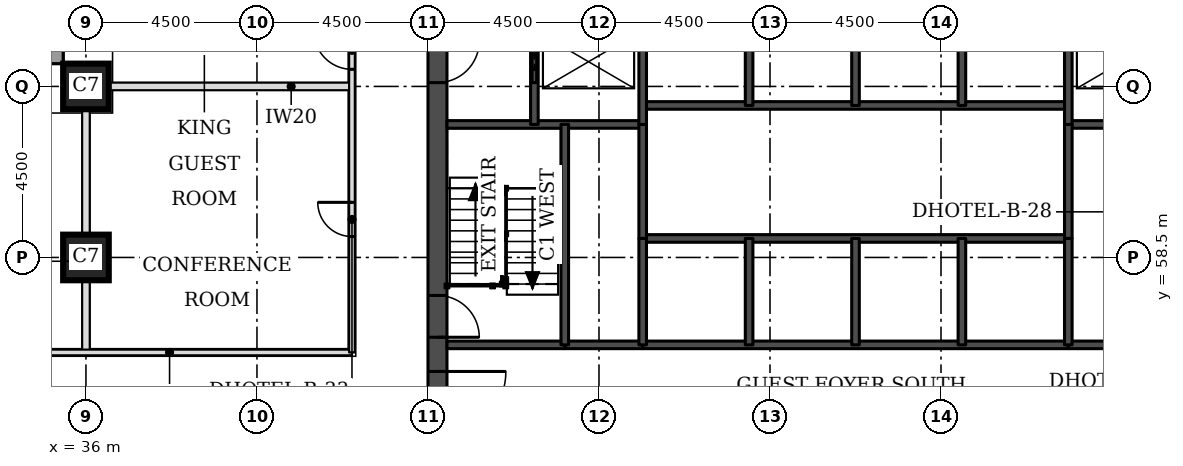
"""IFC4 building model, lengths in metres.
Left out: names, types, materials, properties, quantities, classifications, styles, units other than length and angle.
Written with IfcOpenShell. Run it as: python <this file> out.ifc"""

import sys

from ifc_helpers import new_model, si_unit, direction, frame, frame_2d, origin, origin_2d, place, context, subcontext, project, spatial, rectangle, extrude, element, fill, save


model = new_model("IFC4")
c1 = context("Model", 3, precision=1e-05, world=origin(), true_north=direction((0.0, 1.0)))
c2 = subcontext(c1, "Body", "Model", "MODEL_VIEW")
j1 = project(units=[si_unit("LENGTHUNIT", "METRE"), si_unit("PLANEANGLEUNIT", "RADIAN")], contexts=[c1])
p1 = place(None, origin())
s1 = spatial("IfcSite", under=j1, at=p1, CompositionType="ELEMENT")
p2 = place(p1, origin())
s2 = spatial("IfcBuilding", under=s1, at=p2, CompositionType="ELEMENT")
p3 = place(p2, frame((0.0, 0.0, 29.7)))
s3 = spatial("IfcBuildingStorey", under=s2, at=p3, CompositionType="ELEMENT", Elevation=29.7)
for number, where, z_axis, x_axis in (
    (1, (36.0, 58.5, 0.0), (0.0, 0.0, 1.0), (1.0, 0.0, 0.0)),
    (2, (36.0, 63.0, 0.0), (0.0, 0.0, 1.0), (1.0, 0.0, 0.0)),
):
    element("IfcColumn", number, at=place(p3, frame(where, z_axis=z_axis, x_axis=x_axis)), inside=s3, PredefinedType="COLUMN", context=c2, shape_type="SweptSolid", body=[
        extrude(rectangle(XDim=1.2, YDim=1.2, at=origin_2d()), origin(), (0.0, 0.0, 1.0), 3.3),
    ])
p4 = place(p3, frame((45.25, 49.5, 0.0), z_axis=(0.0, 0.0, 1.0), x_axis=(0.0, 1.0, 0.0)))
e3 = element("IfcWall", 3, at=p4, inside=s3, PredefinedType="SHEAR", context=c2, shape_type="SweptSolid", body=[
    extrude(rectangle(XDim=22.5, YDim=0.5, at=frame_2d((11.25, 0.0))), origin(), (0.0, 0.0, 1.0), 3.3),
])
p5 = place(p4, frame((4.2, 0.0, 0.0)))
e4 = element("IfcOpeningElement", 4, at=p5, cuts=e3, PredefinedType="OPENING", context=c2, shape_type="SweptSolid", body=[
    extrude(rectangle(XDim=1.8, YDim=2.1, at=frame_2d((0.9, 1.05))), frame((0.0, 0.26, 0.0), z_axis=(0.0, -1.0, 0.0), x_axis=(1.0, 0.0, 0.0)), (0.0, 0.0, 1.0), 0.52),
])
p6 = place(p4, frame((6.9, 0.0, 0.0)))
e5 = element("IfcOpeningElement", 5, at=p6, cuts=e3, PredefinedType="OPENING", context=c2, shape_type="SweptSolid", body=[
    extrude(rectangle(XDim=1.1, YDim=2.1, at=frame_2d((0.55, 1.05))), frame((0.0, 0.26, 0.0), z_axis=(0.0, -1.0, 0.0), x_axis=(1.0, 0.0, 0.0)), (0.0, 0.0, 1.0), 0.52),
])
p7 = place(p4, frame((13.6, 0.0, 0.0)))
e6 = element("IfcOpeningElement", 6, at=p7, cuts=e3, PredefinedType="OPENING", context=c2, shape_type="SweptSolid", body=[
    extrude(rectangle(XDim=1.1, YDim=2.1, at=frame_2d((0.55, 1.05))), frame((0.0, 0.26, 0.0), z_axis=(0.0, -1.0, 0.0), x_axis=(1.0, 0.0, 0.0)), (0.0, 0.0, 1.0), 0.52),
])
p8 = place(p4, frame((16.5, 0.0, 0.0)))
e7 = element("IfcOpeningElement", 7, at=p8, cuts=e3, PredefinedType="OPENING", context=c2, shape_type="SweptSolid", body=[
    extrude(rectangle(XDim=1.8, YDim=2.1, at=frame_2d((0.9, 1.05))), frame((0.0, 0.26, 0.0), z_axis=(0.0, -1.0, 0.0), x_axis=(1.0, 0.0, 0.0)), (0.0, 0.0, 1.0), 0.52),
])
p9 = place(p3, frame((35.225, 76.894, 0.0), z_axis=(0.0, 0.0, 1.0), x_axis=(0.0, -1.0, 0.0)))
e8 = element("IfcWall", 8, at=p9, inside=s3, PredefinedType="STANDARD", context=c2, shape_type="SweptSolid", body=[
    extrude(rectangle(XDim=13.293, YDim=0.35, at=frame_2d((6.647, 0.0))), origin(), (0.0, 0.0, 1.0), 3.055),
])
p10 = place(p9, frame((9.493, 0.0, 0.8)))
e9 = element("IfcOpeningElement", 9, at=p10, cuts=e8, PredefinedType="OPENING", context=c2, shape_type="SweptSolid", body=[
    extrude(rectangle(XDim=3.3, YDim=1.5, at=frame_2d((1.65, 0.75))), frame((0.0, 0.185, 0.0), z_axis=(0.0, -1.0, 0.0), x_axis=(1.0, 0.0, 0.0)), (0.0, 0.0, 1.0), 0.37),
])
p11 = place(p3, frame((35.4, 63.775, 0.0), z_axis=(0.0, 0.0, 1.0), x_axis=(-1.0, 0.0, 0.0)))
e10 = element("IfcWall", 10, at=p11, inside=s3, PredefinedType="STANDARD", context=c2, shape_type="SweptSolid", body=[
    extrude(rectangle(XDim=17.793, YDim=0.35, at=frame_2d((8.897, 0.0))), origin(), (0.0, 0.0, 1.0), 3.055),
])
p12 = place(p11, frame((0.5, 0.0, 0.8)))
e11 = element("IfcOpeningElement", 11, at=p12, cuts=e10, PredefinedType="OPENING", context=c2, shape_type="SweptSolid", body=[
    extrude(rectangle(XDim=3.3, YDim=1.5, at=frame_2d((1.65, 0.75))), frame((0.0, 0.185, 0.0), z_axis=(0.0, -1.0, 0.0), x_axis=(1.0, 0.0, 0.0)), (0.0, 0.0, 1.0), 0.37),
])
p13 = place(p11, frame((9.0, 0.0, 0.8)))
e12 = element("IfcOpeningElement", 12, at=p13, cuts=e10, PredefinedType="OPENING", context=c2, shape_type="SweptSolid", body=[
    extrude(rectangle(XDim=3.3, YDim=1.5, at=frame_2d((1.65, 0.75))), frame((0.0, 0.185, 0.0), z_axis=(0.0, -1.0, 0.0), x_axis=(1.0, 0.0, 0.0)), (0.0, 0.0, 1.0), 0.37),
])
p14 = place(p3, frame((36.0, 56.0, 0.0), z_axis=(0.0, 0.0, 1.0), x_axis=(0.0, 1.0, 0.0)))
e13 = element("IfcWall", 13, at=p14, inside=s3, PredefinedType="PARTITIONING", context=c2, shape_type="SweptSolid", body=[
    extrude(rectangle(XDim=6.4, YDim=0.2, at=frame_2d((3.2, 0.0))), origin(), (0.0, 0.0, 1.0), 2.33),
])
p15 = place(p3, frame((36.6, 63.0, 0.0), z_axis=(0.0, 0.0, 1.0), x_axis=(1.0, 0.0, 0.0)))
e14 = element("IfcWall", 14, at=p15, inside=s3, PredefinedType="PARTITIONING", context=c2, shape_type="SweptSolid", body=[
    extrude(rectangle(XDim=6.4, YDim=0.2, at=frame_2d((3.2, 0.0))), origin(), (0.0, 0.0, 1.0), 3.08),
])
p16 = place(p3, frame((27.0, 56.0, 0.0), z_axis=(0.0, 0.0, 1.0), x_axis=(1.0, 0.0, 0.0)))
e15 = element("IfcWall", 15, at=p16, inside=s3, PredefinedType="PARTITIONING", context=c2, shape_type="SweptSolid", body=[
    extrude(rectangle(XDim=16.0, YDim=0.15, at=frame_2d((8.0, 0.0))), origin(), (0.0, 0.0, 1.0), 3.08),
])
p17 = place(p16, frame((5.6, 0.0, 0.0)))
e16 = element("IfcOpeningElement", 16, at=p17, cuts=e15, PredefinedType="OPENING", context=c2, shape_type="SweptSolid", body=[
    extrude(rectangle(XDim=1.0, YDim=2.1, at=frame_2d((0.5, 1.05))), frame((0.0, 0.085, 0.0), z_axis=(0.0, -1.0, 0.0), x_axis=(1.0, 0.0, 0.0)), (0.0, 0.0, 1.0), 0.17),
])
p18 = place(p3, frame((43.0, 56.0, 0.0), z_axis=(0.0, 0.0, 1.0), x_axis=(0.0, 1.0, 0.0)))
e17 = element("IfcWall", 17, at=p18, inside=s3, PredefinedType="PARTITIONING", context=c2, shape_type="SweptSolid", body=[
    extrude(rectangle(XDim=18.0, YDim=0.15, at=frame_2d((9.0, 0.0))), origin(), (0.0, 0.0, 1.0), 3.08),
])
p19 = place(p18, frame((7.45, 0.0, 0.0)))
e18 = element("IfcOpeningElement", 18, at=p19, cuts=e17, PredefinedType="OPENING", context=c2, shape_type="SweptSolid", body=[
    extrude(rectangle(XDim=1.0, YDim=2.1, at=frame_2d((0.5, 1.05))), frame((0.0, 0.085, 0.0), z_axis=(0.0, -1.0, 0.0), x_axis=(1.0, 0.0, 0.0)), (0.0, 0.0, 1.0), 0.17),
])
p20 = place(p18, frame((14.3, 0.0, 0.0)))
e19 = element("IfcOpeningElement", 19, at=p20, cuts=e17, PredefinedType="OPENING", context=c2, shape_type="SweptSolid", body=[
    extrude(rectangle(XDim=1.0, YDim=2.1, at=frame_2d((0.5, 1.05))), frame((0.0, 0.085, 0.0), z_axis=(0.0, -1.0, 0.0), x_axis=(1.0, 0.0, 0.0)), (0.0, 0.0, 1.0), 0.17),
])
p21 = place(p18, frame((16.45, 0.0, 0.0)))
e20 = element("IfcOpeningElement", 20, at=p21, cuts=e17, PredefinedType="OPENING", context=c2, shape_type="SweptSolid", body=[
    extrude(rectangle(XDim=1.0, YDim=2.1, at=frame_2d((0.5, 1.05))), frame((0.0, 0.085, 0.0), z_axis=(0.0, -1.0, 0.0), x_axis=(1.0, 0.0, 0.0)), (0.0, 0.0, 1.0), 0.17),
])
p22 = place(p18, frame((3.05, 0.0, 0.0)))
e21 = element("IfcOpeningElement", 21, at=p22, cuts=e17, PredefinedType="OPENING", context=c2, shape_type="SweptSolid", body=[
    extrude(rectangle(XDim=0.9, YDim=2.1, at=frame_2d((0.45, 1.05))), frame((0.0, 0.085, 0.0), z_axis=(0.0, -1.0, 0.0), x_axis=(1.0, 0.0, 0.0)), (0.0, 0.0, 1.0), 0.17),
])
for number, where, z_axis, x_axis in (
    (22, (48.6, 56.2, 0.0), (0.0, 0.0, 1.0), (1.0, 0.0, 0.0)),
    (23, (61.85, 56.2, 0.0), (0.0, 0.0, 1.0), (1.0, 0.0, 0.0)),
):
    element("IfcWall", number, at=place(p3, frame(where, z_axis=z_axis, x_axis=x_axis)), inside=s3, PredefinedType="SOLIDWALL", context=c2, shape_type="SweptSolid", body=[
        extrude(rectangle(XDim=2.05, YDim=0.2, at=frame_2d((1.025, 0.0))), origin(), (0.0, 0.0, 1.0), 3.08),
    ])
p23 = place(p3, frame((45.5, 56.2, 0.0), z_axis=(0.0, 0.0, 1.0), x_axis=(1.0, 0.0, 0.0)))
e24 = element("IfcWall", 24, at=p23, inside=s3, PredefinedType="SOLIDWALL", context=c2, shape_type="SweptSolid", body=[
    extrude(rectangle(XDim=3.1, YDim=0.2, at=frame_2d((1.55, 0.0))), origin(), (0.0, 0.0, 1.0), 3.08),
])
p24 = place(p3, frame((50.65, 56.2, 0.0), z_axis=(0.0, 0.0, 1.0), x_axis=(1.0, 0.0, 0.0)))
e25 = element("IfcWall", 25, at=p24, inside=s3, PredefinedType="SOLIDWALL", context=c2, shape_type="SweptSolid", body=[
    extrude(rectangle(XDim=11.2, YDim=0.2, at=frame_2d((5.6, 0.0))), origin(), (0.0, 0.0, 1.0), 3.08),
])
p25 = place(p3, frame((50.65, 59.0, 0.0), z_axis=(0.0, 0.0, 1.0), x_axis=(1.0, 0.0, 0.0)))
e26 = element("IfcWall", 26, at=p25, inside=s3, PredefinedType="SOLIDWALL", context=c2, shape_type="SweptSolid", body=[
    extrude(rectangle(XDim=11.2, YDim=0.2, at=frame_2d((5.6, 0.0))), origin(), (0.0, 0.0, 1.0), 3.3),
])
for number, where, z_axis, x_axis in (
    (27, (45.5, 62.0, 0.0), (0.0, 0.0, 1.0), (1.0, 0.0, 0.0)),
    (28, (61.85, 62.0, 0.0), (0.0, 0.0, 1.0), (1.0, 0.0, 0.0)),
):
    element("IfcWall", number, at=place(p3, frame(where, z_axis=z_axis, x_axis=x_axis)), inside=s3, PredefinedType="SOLIDWALL", context=c2, shape_type="SweptSolid", body=[
        extrude(rectangle(XDim=5.15, YDim=0.2, at=frame_2d((2.575, 0.0))), origin(), (0.0, 0.0, 1.0), 3.08),
    ])
p26 = place(p3, frame((50.65, 62.5, 0.0), z_axis=(0.0, 0.0, 1.0), x_axis=(1.0, 0.0, 0.0)))
e29 = element("IfcWall", 29, at=p26, inside=s3, PredefinedType="SOLIDWALL", context=c2, shape_type="SweptSolid", body=[
    extrude(rectangle(XDim=11.2, YDim=0.2, at=frame_2d((5.6, 0.0))), origin(), (0.0, 0.0, 1.0), 3.3),
])
p27 = place(p3, frame((47.8, 62.0, 0.0), z_axis=(0.0, 0.0, 1.0), x_axis=(0.0, 1.0, 0.0)))
e30 = element("IfcWall", 30, at=p27, inside=s3, PredefinedType="SOLIDWALL", context=c2, shape_type="SweptSolid", body=[
    extrude(rectangle(XDim=3.3, YDim=0.2, at=frame_2d((1.65, 0.0))), origin(), (0.0, 0.0, 1.0), 3.08),
])
p28 = place(p27, frame((1.1, 0.0, 0.0)))
e31 = element("IfcOpeningElement", 31, at=p28, cuts=e30, PredefinedType="OPENING", context=c2, shape_type="SweptSolid", body=[
    extrude(rectangle(XDim=1.1, YDim=2.1, at=frame_2d((0.55, 1.05))), frame((0.0, 0.11, 0.0), z_axis=(0.0, -1.0, 0.0), x_axis=(1.0, 0.0, 0.0)), (0.0, 0.0, 1.0), 0.22),
])
p29 = place(p3, frame((48.6, 56.2, 0.0), z_axis=(0.0, 0.0, 1.0), x_axis=(0.0, 1.0, 0.0)))
e32 = element("IfcWall", 32, at=p29, inside=s3, PredefinedType="SOLIDWALL", context=c2, shape_type="SweptSolid", body=[
    extrude(rectangle(XDim=5.8, YDim=0.2, at=frame_2d((2.9, 0.0))), origin(), (0.0, 0.0, 1.0), 3.08),
])
p30 = place(p3, frame((50.65, 59.0, 0.0), z_axis=(0.0, 0.0, 1.0), x_axis=(0.0, 1.0, 0.0)))
e33 = element("IfcWall", 33, at=p30, inside=s3, PredefinedType="SOLIDWALL", context=c2, shape_type="SweptSolid", body=[
    extrude(rectangle(XDim=3.0, YDim=0.2, at=frame_2d((1.5, 0.0))), origin(), (0.0, 0.0, 1.0), 3.3),
])
p31 = place(p3, frame((50.65, 56.2, 0.0), z_axis=(0.0, 0.0, 1.0), x_axis=(0.0, 1.0, 0.0)))
e34 = element("IfcWall", 34, at=p31, inside=s3, PredefinedType="SOLIDWALL", context=c2, shape_type="SweptSolid", body=[
    extrude(rectangle(XDim=2.8, YDim=0.2, at=frame_2d((1.4, 0.0))), origin(), (0.0, 0.0, 1.0), 3.08),
])
p32 = place(p3, frame((50.65, 62.0, 0.0), z_axis=(0.0, 0.0, 1.0), x_axis=(0.0, 1.0, 0.0)))
e35 = element("IfcWall", 35, at=p32, inside=s3, PredefinedType="SOLIDWALL", context=c2, shape_type="SweptSolid", body=[
    extrude(rectangle(XDim=3.3, YDim=0.2, at=frame_2d((1.65, 0.0))), origin(), (0.0, 0.0, 1.0), 3.08),
])
for number, where, z_axis, x_axis in (
    (36, (53.45, 56.2, 0.0), (0.0, 0.0, 1.0), (0.0, 1.0, 0.0)),
    (37, (53.45, 62.5, 0.0), (0.0, 0.0, 1.0), (0.0, 1.0, 0.0)),
    (38, (56.25, 56.2, 0.0), (0.0, 0.0, 1.0), (0.0, 1.0, 0.0)),
    (39, (56.25, 62.5, 0.0), (0.0, 0.0, 1.0), (0.0, 1.0, 0.0)),
    (40, (59.05, 56.2, 0.0), (0.0, 0.0, 1.0), (0.0, 1.0, 0.0)),
    (41, (59.05, 62.5, 0.0), (0.0, 0.0, 1.0), (0.0, 1.0, 0.0)),
):
    element("IfcWall", number, at=place(p3, frame(where, z_axis=z_axis, x_axis=x_axis)), inside=s3, PredefinedType="SOLIDWALL", context=c2, shape_type="SweptSolid", body=[
        extrude(rectangle(XDim=2.8, YDim=0.2, at=frame_2d((1.4, 0.0))), origin(), (0.0, 0.0, 1.0), 3.08),
    ])
p33 = place(p3, frame((61.85, 59.0, 0.0), z_axis=(0.0, 0.0, 1.0), x_axis=(0.0, 1.0, 0.0)))
e42 = element("IfcWall", 42, at=p33, inside=s3, PredefinedType="SOLIDWALL", context=c2, shape_type="SweptSolid", body=[
    extrude(rectangle(XDim=3.0, YDim=0.2, at=frame_2d((1.5, 0.0))), origin(), (0.0, 0.0, 1.0), 3.3),
])
p34 = place(p3, frame((61.85, 56.2, 0.0), z_axis=(0.0, 0.0, 1.0), x_axis=(0.0, 1.0, 0.0)))
e43 = element("IfcWall", 43, at=p34, inside=s3, PredefinedType="SOLIDWALL", context=c2, shape_type="SweptSolid", body=[
    extrude(rectangle(XDim=2.8, YDim=0.2, at=frame_2d((1.4, 0.0))), origin(), (0.0, 0.0, 1.0), 3.08),
])
p35 = place(p3, frame((61.85, 62.0, 0.0), z_axis=(0.0, 0.0, 1.0), x_axis=(0.0, 1.0, 0.0)))
e44 = element("IfcWall", 44, at=p35, inside=s3, PredefinedType="SOLIDWALL", context=c2, shape_type="SweptSolid", body=[
    extrude(rectangle(XDim=3.3, YDim=0.2, at=frame_2d((1.65, 0.0))), origin(), (0.0, 0.0, 1.0), 3.08),
])
p36 = place(p19, origin())
e45 = element("IfcDoor", 45, at=p36, inside=s3, OperationType="SINGLE_SWING_RIGHT", PredefinedType="DOOR", context=c2, shape_type="SweptSolid", body=[
    extrude(rectangle(XDim=1.0, YDim=2.1, at=frame_2d((0.5, 1.05))), frame((0.0, 0.025, 0.0), z_axis=(0.0, -1.0, 0.0), x_axis=(1.0, 0.0, 0.0)), (0.0, 0.0, 1.0), 0.05),
])
fill(e18, e45)
p37 = place(p22, origin())
e46 = element("IfcDoor", 46, at=p37, inside=s3, OperationType="SINGLE_SWING_RIGHT", PredefinedType="DOOR", context=c2, shape_type="SweptSolid", body=[
    extrude(rectangle(XDim=0.9, YDim=2.1, at=frame_2d((0.45, 1.05))), frame((0.0, 0.025, 0.0), z_axis=(0.0, -1.0, 0.0), x_axis=(1.0, 0.0, 0.0)), (0.0, 0.0, 1.0), 0.05),
])
fill(e21, e46)
p38 = place(p28, origin())
e47 = element("IfcDoor", 47, at=p38, inside=s3, OperationType="DOUBLE_DOOR_SLIDING", PredefinedType="DOOR", context=c2, shape_type="SweptSolid", body=[
    extrude(rectangle(XDim=1.1, YDim=2.1, at=frame_2d((0.55, 1.05))), frame((0.0, 0.025, 0.0), z_axis=(0.0, -1.0, 0.0), x_axis=(1.0, 0.0, 0.0)), (0.0, 0.0, 1.0), 0.05),
])
fill(e31, e47)
p39 = place(p5, frame((1.8, 0.0, 0.0), z_axis=(0.0, 0.0, 1.0), x_axis=(-1.0, 0.0, 0.0)))
e48 = element("IfcDoor", 48, at=p39, inside=s3, OperationType="SINGLE_SWING_LEFT", PredefinedType="DOOR", context=c2, shape_type="SweptSolid", body=[
    extrude(rectangle(XDim=1.8, YDim=2.1, at=frame_2d((0.9, 1.05))), frame((0.0, 0.025, 0.0), z_axis=(0.0, -1.0, 0.0), x_axis=(1.0, 0.0, 0.0)), (0.0, 0.0, 1.0), 0.05),
])
fill(e4, e48)
p40 = place(p6, frame((1.1, 0.0, 0.0), z_axis=(0.0, 0.0, 1.0), x_axis=(-1.0, 0.0, 0.0)))
e49 = element("IfcDoor", 49, at=p40, inside=s3, OperationType="SINGLE_SWING_RIGHT", PredefinedType="DOOR", context=c2, shape_type="SweptSolid", body=[
    extrude(rectangle(XDim=1.1, YDim=2.1, at=frame_2d((0.55, 1.05))), frame((0.0, 0.025, 0.0), z_axis=(0.0, -1.0, 0.0), x_axis=(1.0, 0.0, 0.0)), (0.0, 0.0, 1.0), 0.05),
])
fill(e5, e49)
p41 = place(p7, frame((1.1, 0.0, 0.0), z_axis=(0.0, 0.0, 1.0), x_axis=(-1.0, 0.0, 0.0)))
e50 = element("IfcDoor", 50, at=p41, inside=s3, OperationType="SINGLE_SWING_LEFT", PredefinedType="DOOR", context=c2, shape_type="SweptSolid", body=[
    extrude(rectangle(XDim=1.1, YDim=2.1, at=frame_2d((0.55, 1.05))), frame((0.0, 0.025, 0.0), z_axis=(0.0, -1.0, 0.0), x_axis=(1.0, 0.0, 0.0)), (0.0, 0.0, 1.0), 0.05),
])
fill(e6, e50)
save(model, sys.argv[1])
